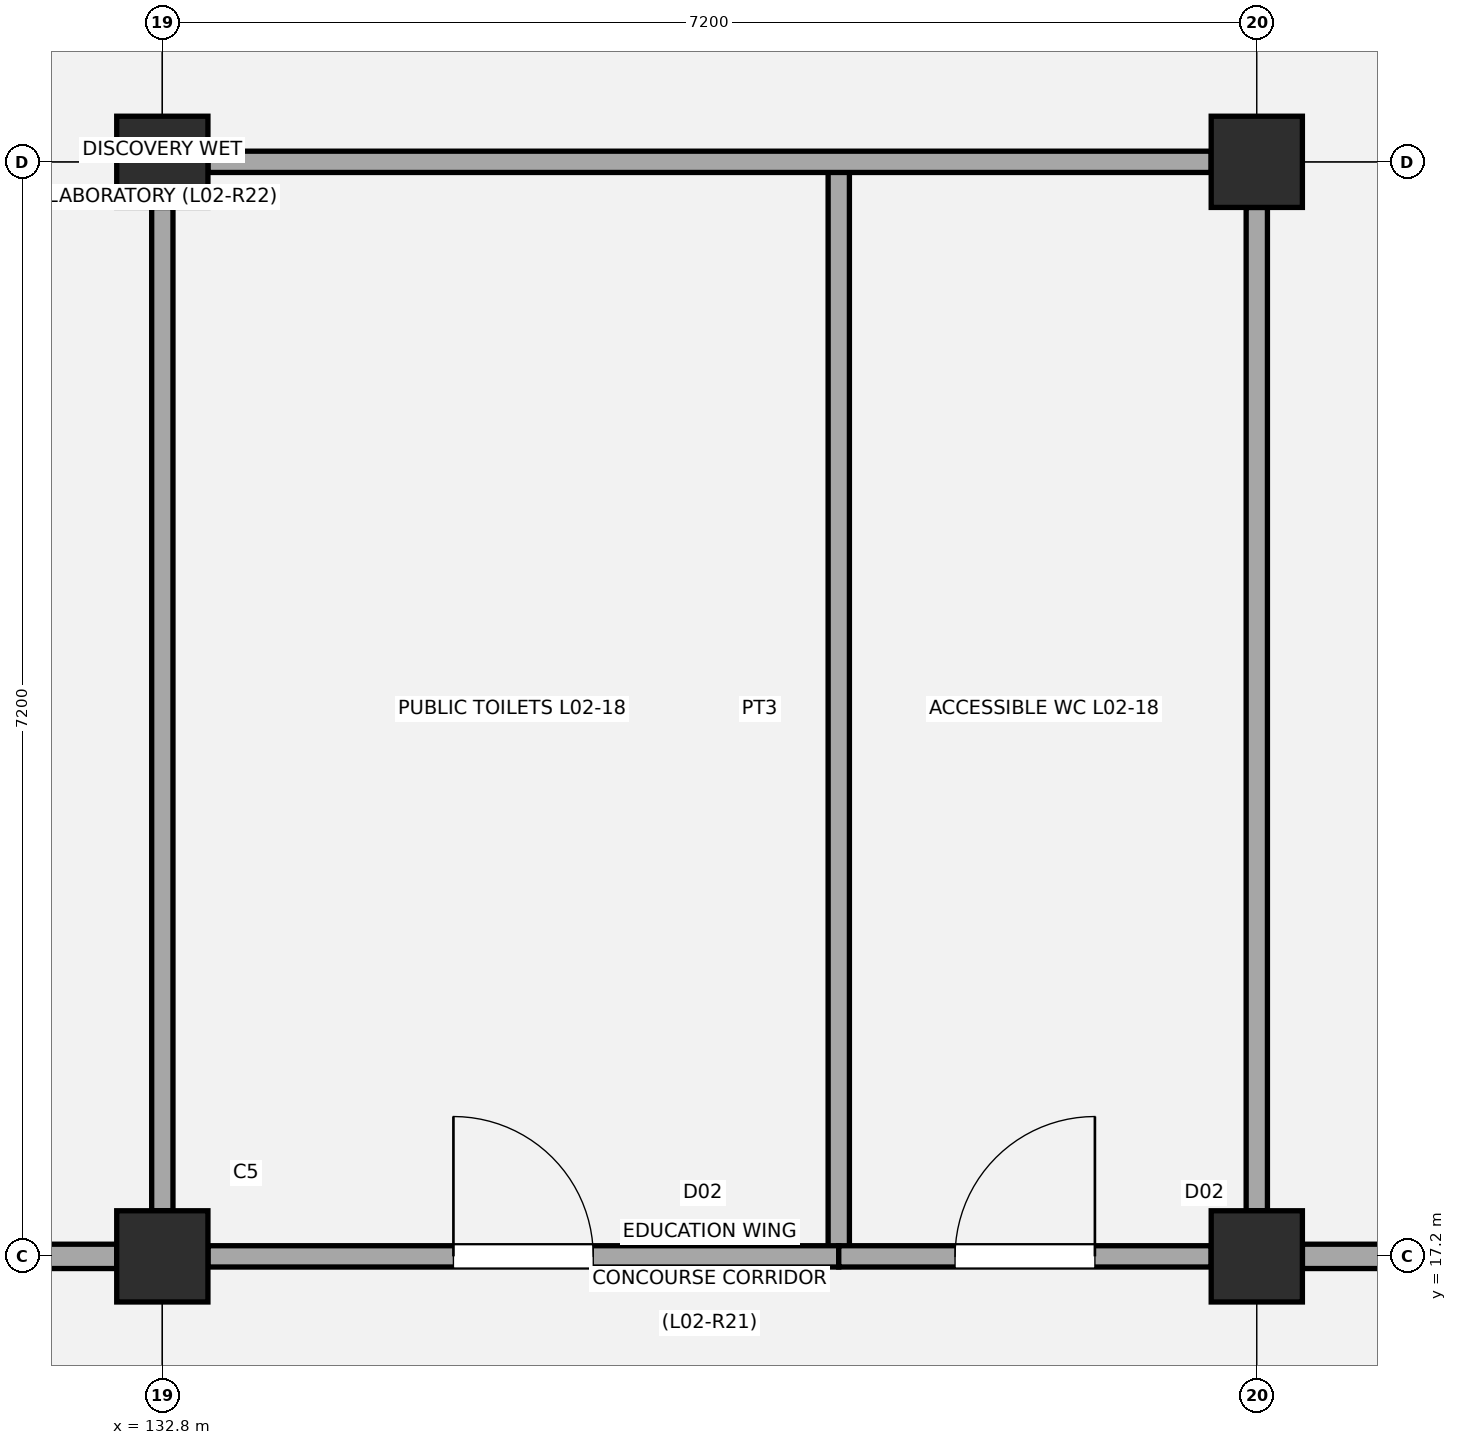
"""IFC4 building model, lengths in metres.
Left out: names, types, materials, properties, quantities, classifications, styles, units other than length and angle.
Written with IfcOpenShell. Run it as: python <this file> out.ifc"""

import sys

from ifc_helpers import new_model, si_unit, direction, frame, frame_2d, origin, origin_2d, place, context, subcontext, project, spatial, rectangle, extrude, element, fill, save


model = new_model("IFC4")
c1 = context("Model", 3, precision=1e-05, world=origin(), true_north=direction((0.0, 1.0)))
c2 = subcontext(c1, "Body", "Model", "MODEL_VIEW")
j1 = project(units=[si_unit("LENGTHUNIT", "METRE"), si_unit("PLANEANGLEUNIT", "RADIAN")], contexts=[c1])
p1 = place(None, origin())
s1 = spatial("IfcSite", under=j1, at=p1, CompositionType="ELEMENT")
p2 = place(p1, origin())
s2 = spatial("IfcBuilding", under=s1, at=p2, CompositionType="ELEMENT")
p3 = place(p2, frame((0.0, 0.0, 9.18)))
s3 = spatial("IfcBuildingStorey", under=s2, at=p3, CompositionType="ELEMENT", Elevation=9.18)
for number, where, z_axis, x_axis in (
    (1, (132.8, 17.2, 0.0), (0.0, 0.0, 1.0), (1.0, 0.0, 0.0)),
    (2, (132.8, 24.4, 0.0), (0.0, 0.0, 1.0), (1.0, 0.0, 0.0)),
    (3, (140.0, 17.2, 0.0), (0.0, 0.0, 1.0), (1.0, 0.0, 0.0)),
    (4, (140.0, 24.4, 0.0), (0.0, 0.0, 1.0), (1.0, 0.0, 0.0)),
):
    element("IfcColumn", number, at=place(p3, frame(where, z_axis=z_axis, x_axis=x_axis)), inside=s3, PredefinedType="COLUMN", context=c2, shape_type="SweptSolid", body=[
        extrude(rectangle(XDim=0.6, YDim=0.6, at=origin_2d()), origin(), (0.0, 0.0, 1.0), 4.32),
    ])
p4 = place(p3, frame((137.25, 17.2, 0.0), z_axis=(0.0, 0.0, 1.0), x_axis=(0.0, 1.0, 0.0)))
e5 = element("IfcWall", 5, at=p4, inside=s3, PredefinedType="PARTITIONING", context=c2, shape_type="SweptSolid", body=[
    extrude(rectangle(XDim=7.2, YDim=0.14, at=frame_2d((3.6, 0.0))), origin(), (0.0, 0.0, 1.0), 3.5),
])
p5 = place(p3, frame((133.1, 17.2, 0.0), z_axis=(0.0, 0.0, 1.0), x_axis=(1.0, 0.0, 0.0)))
e6 = element("IfcWall", 6, at=p5, inside=s3, PredefinedType="PARTITIONING", context=c2, shape_type="SweptSolid", body=[
    extrude(rectangle(XDim=4.15, YDim=0.14, at=frame_2d((2.075, 0.0))), origin(), (0.0, 0.0, 1.0), 3.42),
])
p6 = place(p5, frame((1.615, 0.0, 0.0)))
e7 = element("IfcOpeningElement", 7, at=p6, cuts=e6, PredefinedType="OPENING", context=c2, shape_type="SweptSolid", body=[
    extrude(rectangle(XDim=0.92, YDim=2.08, at=frame_2d((0.46, 1.04))), frame((0.0, 0.08, 0.0), z_axis=(0.0, -1.0, 0.0), x_axis=(1.0, 0.0, 0.0)), (0.0, 0.0, 1.0), 0.16),
])
p7 = place(p3, frame((137.25, 17.2, 0.0), z_axis=(0.0, 0.0, 1.0), x_axis=(1.0, 0.0, 0.0)))
e8 = element("IfcWall", 8, at=p7, inside=s3, PredefinedType="PARTITIONING", context=c2, shape_type="SweptSolid", body=[
    extrude(rectangle(XDim=2.45, YDim=0.14, at=frame_2d((1.225, 0.0))), origin(), (0.0, 0.0, 1.0), 3.42),
])
p8 = place(p7, frame((0.765, 0.0, 0.0)))
e9 = element("IfcOpeningElement", 9, at=p8, cuts=e8, PredefinedType="OPENING", context=c2, shape_type="SweptSolid", body=[
    extrude(rectangle(XDim=0.92, YDim=2.08, at=frame_2d((0.46, 1.04))), frame((0.0, 0.08, 0.0), z_axis=(0.0, -1.0, 0.0), x_axis=(1.0, 0.0, 0.0)), (0.0, 0.0, 1.0), 0.16),
])
p9 = place(p3, frame((133.1, 24.4, 0.0), z_axis=(0.0, 0.0, 1.0), x_axis=(1.0, 0.0, 0.0)))
e10 = element("IfcWall", 10, at=p9, inside=s3, PredefinedType="PARTITIONING", context=c2, shape_type="SweptSolid", body=[
    extrude(rectangle(XDim=6.6, YDim=0.14, at=frame_2d((3.3, 0.0))), origin(), (0.0, 0.0, 1.0), 3.47),
])
for number, where, z_axis, x_axis in (
    (11, (132.8, 17.5, 0.0), (0.0, 0.0, 1.0), (0.0, 1.0, 0.0)),
    (12, (140.0, 17.5, 0.0), (0.0, 0.0, 1.0), (0.0, 1.0, 0.0)),
):
    element("IfcWall", number, at=place(p3, frame(where, z_axis=z_axis, x_axis=x_axis)), inside=s3, PredefinedType="PARTITIONING", context=c2, shape_type="SweptSolid", body=[
        extrude(rectangle(XDim=6.6, YDim=0.14, at=frame_2d((3.3, 0.0))), origin(), (0.0, 0.0, 1.0), 3.42),
    ])
p10 = place(p3, frame((125.9, 17.2, 0.0), z_axis=(0.0, 0.0, 1.0), x_axis=(1.0, 0.0, 0.0)))
e13 = element("IfcWall", 13, at=p10, inside=s3, PredefinedType="PARTITIONING", context=c2, shape_type="SweptSolid", body=[
    extrude(rectangle(XDim=6.6, YDim=0.16, at=frame_2d((3.3, 0.0))), origin(), (0.0, 0.0, 1.0), 3.47),
])
p11 = place(p3, frame((140.3, 17.2, 0.0), z_axis=(0.0, 0.0, 1.0), x_axis=(1.0, 0.0, 0.0)))
e14 = element("IfcWall", 14, at=p11, inside=s3, PredefinedType="PARTITIONING", context=c2, shape_type="SweptSolid", body=[
    extrude(rectangle(XDim=6.6, YDim=0.16, at=frame_2d((3.3, 0.0))), origin(), (0.0, 0.0, 1.0), 3.47),
])
p12 = place(p6, origin())
e15 = element("IfcDoor", 15, at=p12, inside=s3, OperationType="SINGLE_SWING_LEFT", PredefinedType="DOOR", context=c2, shape_type="SweptSolid", body=[
    extrude(rectangle(XDim=0.92, YDim=2.08, at=frame_2d((0.46, 1.04))), frame((0.0, 0.025, 0.0), z_axis=(0.0, -1.0, 0.0), x_axis=(1.0, 0.0, 0.0)), (0.0, 0.0, 1.0), 0.05),
])
fill(e7, e15)
p13 = place(p8, origin())
e16 = element("IfcDoor", 16, at=p13, inside=s3, OperationType="SINGLE_SWING_RIGHT", PredefinedType="DOOR", context=c2, shape_type="SweptSolid", body=[
    extrude(rectangle(XDim=0.92, YDim=2.08, at=frame_2d((0.46, 1.04))), frame((0.0, 0.025, 0.0), z_axis=(0.0, -1.0, 0.0), x_axis=(1.0, 0.0, 0.0)), (0.0, 0.0, 1.0), 0.05),
])
fill(e9, e16)
save(model, sys.argv[1])
